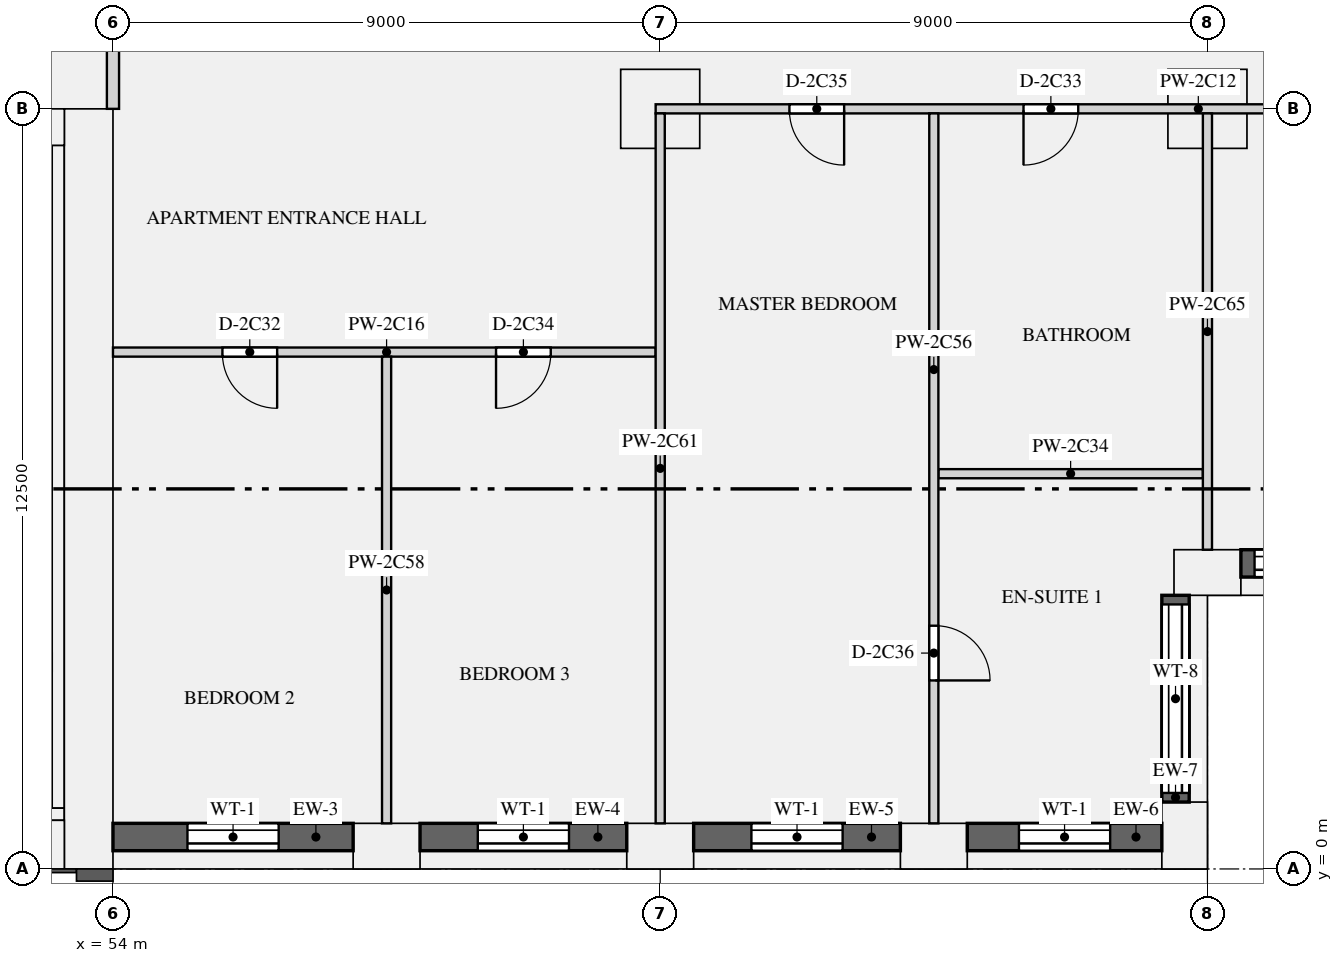
"""IFC4 building model, lengths in metres.
Left out: names, types, materials, properties, quantities, classifications, styles, units other than length and angle.
Written with IfcOpenShell. Run it as: python <this file> out.ifc"""

import sys

from ifc_helpers import new_model, si_unit, direction, frame, frame_2d, origin, origin_2d, place, context, subcontext, project, spatial, rectangle, extrude, element, fill, save


model = new_model("IFC4")
c1 = context("Model", 3, precision=1e-05, world=origin(), true_north=direction((0.0, 1.0)))
c2 = subcontext(c1, "Body", "Model", "MODEL_VIEW")
j1 = project(units=[si_unit("LENGTHUNIT", "METRE"), si_unit("PLANEANGLEUNIT", "RADIAN")], contexts=[c1])
p1 = place(None, origin())
s1 = spatial("IfcSite", under=j1, at=p1, CompositionType="ELEMENT")
p2 = place(p1, origin())
s2 = spatial("IfcBuilding", under=s1, at=p2, CompositionType="ELEMENT")
p3 = place(p2, frame((0.0, 0.0, 102.45)))
s3 = spatial("IfcBuildingStorey", under=s2, at=p3, CompositionType="ELEMENT", Elevation=102.45)
for number, where, z_axis, x_axis in (
    (1, (58.5, 0.375, 0.0), (0.0, 0.0, 1.0), (1.0, 0.0, 0.0)),
    (2, (63.0, 0.375, 0.0), (0.0, 0.0, 1.0), (1.0, 0.0, 0.0)),
    (3, (67.5, 0.375, 0.0), (0.0, 0.0, 1.0), (1.0, 0.0, 0.0)),
    (4, (71.625, 0.55, 0.0), (0.0, 0.0, 1.0), (0.0, 1.0, 0.0)),
    (5, (72.0, 4.875, 0.0), (0.0, 0.0, 1.0), (1.0, 0.0, 0.0)),
):
    element("IfcColumn", number, at=place(p3, frame(where, z_axis=z_axis, x_axis=x_axis)), inside=s3, PredefinedType="USERDEFINED", context=c2, shape_type="SweptSolid", body=[
        extrude(rectangle(XDim=1.1, YDim=0.75, at=origin_2d()), origin(), (0.0, 0.0, 1.0), 3.15),
    ])
for number, where, z_axis, x_axis in (
    (6, (63.0, 12.5, 0.0), (0.0, 0.0, 1.0), (1.0, 0.0, 0.0)),
    (7, (72.0, 12.5, 0.0), (0.0, 0.0, 1.0), (1.0, 0.0, 0.0)),
):
    element("IfcColumn", number, at=place(p3, frame(where, z_axis=z_axis, x_axis=x_axis)), inside=s3, PredefinedType="COLUMN", context=c2, shape_type="SweptSolid", body=[
        extrude(rectangle(XDim=1.3, YDim=1.3, at=origin_2d()), origin(), (0.0, 0.0, 1.0), 3.15),
    ])
p4 = place(p3, frame((53.6, 0.0, 0.0), z_axis=(0.0, 0.0, 1.0), x_axis=(0.0, 1.0, 0.0)))
e8 = element("IfcWall", 8, at=p4, inside=s3, PredefinedType="SHEAR", context=c2, shape_type="SweptSolid", body=[
    extrude(rectangle(XDim=12.5, YDim=0.8, at=frame_2d((6.25, 0.0))), origin(), (0.0, 0.0, 1.0), 3.15),
])
p5 = place(p3, frame((18.8, 0.4, 0.0), z_axis=(0.0, 0.0, 1.0), x_axis=(1.0, 0.0, 0.0)))
e9 = element("IfcWall", 9, at=p5, inside=s3, PredefinedType="SHEAR", context=c2, shape_type="SweptSolid", body=[
    extrude(rectangle(XDim=34.4, YDim=0.8, at=frame_2d((17.2, 0.0))), origin(), (0.0, 0.0, 1.0), 3.15),
])
p6 = place(p3, frame((18.8, 12.2, 0.0), z_axis=(0.0, 0.0, 1.0), x_axis=(1.0, 0.0, 0.0)))
e10 = element("IfcWall", 10, at=p6, inside=s3, PredefinedType="SHEAR", context=c2, shape_type="SweptSolid", body=[
    extrude(rectangle(XDim=34.4, YDim=0.6, at=frame_2d((17.2, 0.0))), origin(), (0.0, 0.0, 1.0), 3.15),
])
p7 = place(p6, frame((24.375, 0.0, 0.0)))
e11 = element("IfcOpeningElement", 11, at=p7, cuts=e10, PredefinedType="OPENING", context=c2, shape_type="SweptSolid", body=[
    extrude(rectangle(XDim=1.1, YDim=2.1, at=frame_2d((0.55, 1.05))), frame((0.0, 0.31, 0.0), z_axis=(0.0, -1.0, 0.0), x_axis=(1.0, 0.0, 0.0)), (0.0, 0.0, 1.0), 0.62),
])
p8 = place(p6, frame((26.625, 0.0, 0.0)))
e12 = element("IfcOpeningElement", 12, at=p8, cuts=e10, PredefinedType="OPENING", context=c2, shape_type="SweptSolid", body=[
    extrude(rectangle(XDim=1.1, YDim=2.1, at=frame_2d((0.55, 1.05))), frame((0.0, 0.31, 0.0), z_axis=(0.0, -1.0, 0.0), x_axis=(1.0, 0.0, 0.0)), (0.0, 0.0, 1.0), 0.62),
])
p9 = place(p6, frame((28.875, 0.0, 0.0)))
e13 = element("IfcOpeningElement", 13, at=p9, cuts=e10, PredefinedType="OPENING", context=c2, shape_type="SweptSolid", body=[
    extrude(rectangle(XDim=1.1, YDim=2.1, at=frame_2d((0.55, 1.05))), frame((0.0, 0.31, 0.0), z_axis=(0.0, -1.0, 0.0), x_axis=(1.0, 0.0, 0.0)), (0.0, 0.0, 1.0), 0.62),
])
p10 = place(p6, frame((4.75, 0.0, 0.0)))
e14 = element("IfcOpeningElement", 14, at=p10, cuts=e10, PredefinedType="OPENING", context=c2, shape_type="SweptSolid", body=[
    extrude(rectangle(XDim=0.9, YDim=2.1, at=frame_2d((0.45, 1.05))), frame((0.0, 0.31, 0.0), z_axis=(0.0, -1.0, 0.0), x_axis=(1.0, 0.0, 0.0)), (0.0, 0.0, 1.0), 0.62),
])
p11 = place(p6, frame((13.75, 0.0, 0.0)))
e15 = element("IfcOpeningElement", 15, at=p11, cuts=e10, PredefinedType="OPENING", context=c2, shape_type="SweptSolid", body=[
    extrude(rectangle(XDim=0.9, YDim=2.1, at=frame_2d((0.45, 1.05))), frame((0.0, 0.31, 0.0), z_axis=(0.0, -1.0, 0.0), x_axis=(1.0, 0.0, 0.0)), (0.0, 0.0, 1.0), 0.62),
])
p12 = place(p6, frame((18.25, 0.0, 0.0)))
e16 = element("IfcOpeningElement", 16, at=p12, cuts=e10, PredefinedType="OPENING", context=c2, shape_type="SweptSolid", body=[
    extrude(rectangle(XDim=0.9, YDim=2.1, at=frame_2d((0.45, 1.05))), frame((0.0, 0.31, 0.0), z_axis=(0.0, -1.0, 0.0), x_axis=(1.0, 0.0, 0.0)), (0.0, 0.0, 1.0), 0.62),
])
p13 = place(p6, frame((1.35, 0.0, 0.0)))
e17 = element("IfcOpeningElement", 17, at=p13, cuts=e10, PredefinedType="OPENING", context=c2, shape_type="SweptSolid", body=[
    extrude(rectangle(XDim=1.2, YDim=2.1, at=frame_2d((0.6, 1.05))), frame((0.0, 0.31, 0.0), z_axis=(0.0, -1.0, 0.0), x_axis=(1.0, 0.0, 0.0)), (0.0, 0.0, 1.0), 0.62),
])
p14 = place(p6, frame((31.85, 0.0, 0.0)))
e18 = element("IfcOpeningElement", 18, at=p14, cuts=e10, PredefinedType="OPENING", context=c2, shape_type="SweptSolid", body=[
    extrude(rectangle(XDim=1.2, YDim=2.1, at=frame_2d((0.6, 1.05))), frame((0.0, 0.31, 0.0), z_axis=(0.0, -1.0, 0.0), x_axis=(1.0, 0.0, 0.0)), (0.0, 0.0, 1.0), 0.62),
])
p15 = place(p3, frame((53.1, 1.0, 0.0), z_axis=(0.0, 0.0, 1.0), x_axis=(0.0, 1.0, 0.0)))
e19 = element("IfcWall", 19, at=p15, inside=s3, PredefinedType="SHEAR", context=c2, shape_type="SweptSolid", body=[
    extrude(rectangle(XDim=10.9, YDim=0.2, at=frame_2d((5.45, 0.0))), origin(), (0.0, 0.0, 1.0), 3.15),
])
p16 = place(p3, frame((18.8, 0.9, 0.0), z_axis=(0.0, 0.0, 1.0), x_axis=(1.0, 0.0, 0.0)))
e20 = element("IfcWall", 20, at=p16, inside=s3, PredefinedType="SHEAR", context=c2, shape_type="SweptSolid", body=[
    extrude(rectangle(XDim=34.4, YDim=0.2, at=frame_2d((17.2, 0.0))), origin(), (0.0, 0.0, 1.0), 3.15),
])
p17 = place(p3, frame((54.0, 0.525, 0.9), z_axis=(0.0, 0.0, 1.0), x_axis=(1.0, 0.0, 0.0)))
e21 = element("IfcWall", 21, at=p17, inside=s3, PredefinedType="SOLIDWALL", context=c2, shape_type="SweptSolid", body=[
    extrude(rectangle(XDim=3.95, YDim=0.45, at=frame_2d((1.975, 0.0))), origin(), (0.0, 0.0, 1.0), 1.93),
])
p18 = place(p17, frame((1.225, 0.0, 0.15)))
e22 = element("IfcOpeningElement", 22, at=p18, cuts=e21, PredefinedType="OPENING", context=c2, shape_type="SweptSolid", body=[
    extrude(rectangle(XDim=1.5, YDim=1.5, at=frame_2d((0.75, 0.75))), frame((0.0, 0.235, 0.0), z_axis=(0.0, -1.0, 0.0), x_axis=(1.0, 0.0, 0.0)), (0.0, 0.0, 1.0), 0.47),
])
p19 = place(p3, frame((59.05, 0.525, 0.9), z_axis=(0.0, 0.0, 1.0), x_axis=(1.0, 0.0, 0.0)))
e23 = element("IfcWall", 23, at=p19, inside=s3, PredefinedType="SOLIDWALL", context=c2, shape_type="SweptSolid", body=[
    extrude(rectangle(XDim=3.4, YDim=0.45, at=frame_2d((1.7, 0.0))), origin(), (0.0, 0.0, 1.0), 1.93),
])
p20 = place(p19, frame((0.95, 0.0, 0.15)))
e24 = element("IfcOpeningElement", 24, at=p20, cuts=e23, PredefinedType="OPENING", context=c2, shape_type="SweptSolid", body=[
    extrude(rectangle(XDim=1.5, YDim=1.5, at=frame_2d((0.75, 0.75))), frame((0.0, 0.235, 0.0), z_axis=(0.0, -1.0, 0.0), x_axis=(1.0, 0.0, 0.0)), (0.0, 0.0, 1.0), 0.47),
])
p21 = place(p3, frame((63.55, 0.525, 0.9), z_axis=(0.0, 0.0, 1.0), x_axis=(1.0, 0.0, 0.0)))
e25 = element("IfcWall", 25, at=p21, inside=s3, PredefinedType="SOLIDWALL", context=c2, shape_type="SweptSolid", body=[
    extrude(rectangle(XDim=3.4, YDim=0.45, at=frame_2d((1.7, 0.0))), origin(), (0.0, 0.0, 1.0), 1.93),
])
p22 = place(p21, frame((0.95, 0.0, 0.15)))
e26 = element("IfcOpeningElement", 26, at=p22, cuts=e25, PredefinedType="OPENING", context=c2, shape_type="SweptSolid", body=[
    extrude(rectangle(XDim=1.5, YDim=1.5, at=frame_2d((0.75, 0.75))), frame((0.0, 0.235, 0.0), z_axis=(0.0, -1.0, 0.0), x_axis=(1.0, 0.0, 0.0)), (0.0, 0.0, 1.0), 0.47),
])
p23 = place(p3, frame((68.05, 0.525, 0.9), z_axis=(0.0, 0.0, 1.0), x_axis=(1.0, 0.0, 0.0)))
e27 = element("IfcWall", 27, at=p23, inside=s3, PredefinedType="SOLIDWALL", context=c2, shape_type="SweptSolid", body=[
    extrude(rectangle(XDim=3.2, YDim=0.45, at=frame_2d((1.6, 0.0))), origin(), (0.0, 0.0, 1.0), 1.93),
])
p24 = place(p23, frame((0.85, 0.0, 0.15)))
e28 = element("IfcOpeningElement", 28, at=p24, cuts=e27, PredefinedType="OPENING", context=c2, shape_type="SweptSolid", body=[
    extrude(rectangle(XDim=1.5, YDim=1.5, at=frame_2d((0.75, 0.75))), frame((0.0, 0.235, 0.0), z_axis=(0.0, -1.0, 0.0), x_axis=(1.0, 0.0, 0.0)), (0.0, 0.0, 1.0), 0.47),
])
p25 = place(p3, frame((71.475, 1.1, 0.9), z_axis=(0.0, 0.0, 1.0), x_axis=(0.0, 1.0, 0.0)))
e29 = element("IfcWall", 29, at=p25, inside=s3, PredefinedType="SOLIDWALL", context=c2, shape_type="SweptSolid", body=[
    extrude(rectangle(XDim=3.4, YDim=0.45, at=frame_2d((1.7, 0.0))), origin(), (0.0, 0.0, 1.0), 1.93),
])
p26 = place(p25, frame((0.15, 0.0, 0.15)))
e30 = element("IfcOpeningElement", 30, at=p26, cuts=e29, PredefinedType="OPENING", context=c2, shape_type="SweptSolid", body=[
    extrude(rectangle(XDim=3.1, YDim=1.5, at=frame_2d((1.55, 0.75))), frame((0.0, 0.235, 0.0), z_axis=(0.0, -1.0, 0.0), x_axis=(1.0, 0.0, 0.0)), (0.0, 0.0, 1.0), 0.47),
])
p27 = place(p3, frame((72.55, 5.025, 0.9), z_axis=(0.0, 0.0, 1.0), x_axis=(1.0, 0.0, 0.0)))
e31 = element("IfcWall", 31, at=p27, inside=s3, PredefinedType="SOLIDWALL", context=c2, shape_type="SweptSolid", body=[
    extrude(rectangle(XDim=3.2, YDim=0.45, at=frame_2d((1.6, 0.0))), origin(), (0.0, 0.0, 1.0), 1.93),
])
p28 = place(p27, frame((0.225, 0.0, 0.15)))
e32 = element("IfcOpeningElement", 32, at=p28, cuts=e31, PredefinedType="OPENING", context=c2, shape_type="SweptSolid", body=[
    extrude(rectangle(XDim=2.75, YDim=1.5, at=frame_2d((1.375, 0.75))), frame((0.0, 0.235, 0.0), z_axis=(0.0, -1.0, 0.0), x_axis=(1.0, 0.0, 0.0)), (0.0, 0.0, 1.0), 0.47),
])
p29 = place(p3, frame((54.0, 12.5, 0.0), z_axis=(0.0, 0.0, 1.0), x_axis=(0.0, 1.0, 0.0)))
e33 = element("IfcWall", 33, at=p29, inside=s3, PredefinedType="PARTITIONING", context=c2, shape_type="SweptSolid", body=[
    extrude(rectangle(XDim=3.4, YDim=0.2, at=frame_2d((1.7, 0.0))), origin(), (0.0, 0.0, 1.0), 2.83),
])
p30 = place(p3, frame((62.925, 12.5, 0.0), z_axis=(0.0, 0.0, 1.0), x_axis=(1.0, 0.0, 0.0)))
e34 = element("IfcWall", 34, at=p30, inside=s3, PredefinedType="PARTITIONING", context=c2, shape_type="SweptSolid", body=[
    extrude(rectangle(XDim=12.825, YDim=0.15, at=frame_2d((6.413, 0.0))), origin(), (0.0, 0.0, 1.0), 2.83),
])
p31 = place(p30, frame((6.05, 0.0, 0.0)))
e35 = element("IfcOpeningElement", 35, at=p31, cuts=e34, PredefinedType="OPENING", context=c2, shape_type="SweptSolid", body=[
    extrude(rectangle(XDim=0.9, YDim=2.1, at=frame_2d((0.45, 1.05))), frame((0.0, 0.085, 0.0), z_axis=(0.0, -1.0, 0.0), x_axis=(1.0, 0.0, 0.0)), (0.0, 0.0, 1.0), 0.17),
])
p32 = place(p30, frame((2.2, 0.0, 0.0)))
e36 = element("IfcOpeningElement", 36, at=p32, cuts=e34, PredefinedType="OPENING", context=c2, shape_type="SweptSolid", body=[
    extrude(rectangle(XDim=0.9, YDim=2.1, at=frame_2d((0.45, 1.05))), frame((0.0, 0.085, 0.0), z_axis=(0.0, -1.0, 0.0), x_axis=(1.0, 0.0, 0.0)), (0.0, 0.0, 1.0), 0.17),
])
p33 = place(p30, frame((10.9, 0.0, 0.0)))
e37 = element("IfcOpeningElement", 37, at=p33, cuts=e34, PredefinedType="OPENING", context=c2, shape_type="SweptSolid", body=[
    extrude(rectangle(XDim=0.9, YDim=2.1, at=frame_2d((0.45, 1.05))), frame((0.0, 0.085, 0.0), z_axis=(0.0, -1.0, 0.0), x_axis=(1.0, 0.0, 0.0)), (0.0, 0.0, 1.0), 0.17),
])
p34 = place(p3, frame((54.0, 8.5, 0.0), z_axis=(0.0, 0.0, 1.0), x_axis=(1.0, 0.0, 0.0)))
e38 = element("IfcWall", 38, at=p34, inside=s3, PredefinedType="PARTITIONING", context=c2, shape_type="SweptSolid", body=[
    extrude(rectangle(XDim=8.925, YDim=0.15, at=frame_2d((4.462, 0.0))), origin(), (0.0, 0.0, 1.0), 2.83),
])
p35 = place(p34, frame((1.8, 0.0, 0.0)))
e39 = element("IfcOpeningElement", 39, at=p35, cuts=e38, PredefinedType="OPENING", context=c2, shape_type="SweptSolid", body=[
    extrude(rectangle(XDim=0.9, YDim=2.1, at=frame_2d((0.45, 1.05))), frame((0.0, 0.085, 0.0), z_axis=(0.0, -1.0, 0.0), x_axis=(1.0, 0.0, 0.0)), (0.0, 0.0, 1.0), 0.17),
])
p36 = place(p34, frame((6.3, 0.0, 0.0)))
e40 = element("IfcOpeningElement", 40, at=p36, cuts=e38, PredefinedType="OPENING", context=c2, shape_type="SweptSolid", body=[
    extrude(rectangle(XDim=0.9, YDim=2.1, at=frame_2d((0.45, 1.05))), frame((0.0, 0.085, 0.0), z_axis=(0.0, -1.0, 0.0), x_axis=(1.0, 0.0, 0.0)), (0.0, 0.0, 1.0), 0.17),
])
p37 = place(p3, frame((67.575, 6.5, 0.0), z_axis=(0.0, 0.0, 1.0), x_axis=(1.0, 0.0, 0.0)))
e41 = element("IfcWall", 41, at=p37, inside=s3, PredefinedType="PARTITIONING", context=c2, shape_type="SweptSolid", body=[
    extrude(rectangle(XDim=4.35, YDim=0.15, at=frame_2d((2.175, 0.0))), origin(), (0.0, 0.0, 1.0), 2.83),
])
p38 = place(p3, frame((67.5, 0.75, 0.0), z_axis=(0.0, 0.0, 1.0), x_axis=(0.0, 1.0, 0.0)))
e42 = element("IfcWall", 42, at=p38, inside=s3, PredefinedType="PARTITIONING", context=c2, shape_type="SweptSolid", body=[
    extrude(rectangle(XDim=11.675, YDim=0.15, at=frame_2d((5.837, 0.0))), origin(), (0.0, 0.0, 1.0), 2.83),
])
p39 = place(p38, frame((2.35, 0.0, 0.0)))
e43 = element("IfcOpeningElement", 43, at=p39, cuts=e42, PredefinedType="OPENING", context=c2, shape_type="SweptSolid", body=[
    extrude(rectangle(XDim=0.9, YDim=2.1, at=frame_2d((0.45, 1.05))), frame((0.0, 0.085, 0.0), z_axis=(0.0, -1.0, 0.0), x_axis=(1.0, 0.0, 0.0)), (0.0, 0.0, 1.0), 0.17),
])
p40 = place(p3, frame((58.5, 0.75, 0.0), z_axis=(0.0, 0.0, 1.0), x_axis=(0.0, 1.0, 0.0)))
e44 = element("IfcWall", 44, at=p40, inside=s3, PredefinedType="PARTITIONING", context=c2, shape_type="SweptSolid", body=[
    extrude(rectangle(XDim=7.675, YDim=0.15, at=frame_2d((3.837, 0.0))), origin(), (0.0, 0.0, 1.0), 2.83),
])
p41 = place(p3, frame((63.0, 0.75, 0.0), z_axis=(0.0, 0.0, 1.0), x_axis=(0.0, 1.0, 0.0)))
e45 = element("IfcWall", 45, at=p41, inside=s3, PredefinedType="PARTITIONING", context=c2, shape_type="SweptSolid", body=[
    extrude(rectangle(XDim=11.675, YDim=0.15, at=frame_2d((5.837, 0.0))), origin(), (0.0, 0.0, 1.0), 2.83),
])
p42 = place(p3, frame((72.0, 5.25, 0.0), z_axis=(0.0, 0.0, 1.0), x_axis=(0.0, 1.0, 0.0)))
e46 = element("IfcWall", 46, at=p42, inside=s3, PredefinedType="PARTITIONING", context=c2, shape_type="SweptSolid", body=[
    extrude(rectangle(XDim=7.175, YDim=0.15, at=frame_2d((3.587, 0.0))), origin(), (0.0, 0.0, 1.0), 2.83),
])
p43 = place(p18, origin())
e47 = element("IfcWindow", 47, at=p43, inside=s3, PartitioningType="SINGLE_PANEL", PredefinedType="WINDOW", context=c2, shape_type="SweptSolid", body=[
    extrude(rectangle(XDim=1.5, YDim=1.5, at=frame_2d((0.75, 0.75))), frame((0.0, -0.065, 0.0), z_axis=(0.0, -1.0, 0.0), x_axis=(1.0, 0.0, 0.0)), (0.0, 0.0, 1.0), 0.06),
])
fill(e22, e47)
p44 = place(p20, origin())
e48 = element("IfcWindow", 48, at=p44, inside=s3, PartitioningType="SINGLE_PANEL", PredefinedType="WINDOW", context=c2, shape_type="SweptSolid", body=[
    extrude(rectangle(XDim=1.5, YDim=1.5, at=frame_2d((0.75, 0.75))), frame((0.0, -0.065, 0.0), z_axis=(0.0, -1.0, 0.0), x_axis=(1.0, 0.0, 0.0)), (0.0, 0.0, 1.0), 0.06),
])
fill(e24, e48)
p45 = place(p22, origin())
e49 = element("IfcWindow", 49, at=p45, inside=s3, PartitioningType="SINGLE_PANEL", PredefinedType="WINDOW", context=c2, shape_type="SweptSolid", body=[
    extrude(rectangle(XDim=1.5, YDim=1.5, at=frame_2d((0.75, 0.75))), frame((0.0, -0.065, 0.0), z_axis=(0.0, -1.0, 0.0), x_axis=(1.0, 0.0, 0.0)), (0.0, 0.0, 1.0), 0.06),
])
fill(e26, e49)
p46 = place(p24, origin())
e50 = element("IfcWindow", 50, at=p46, inside=s3, PartitioningType="SINGLE_PANEL", PredefinedType="WINDOW", context=c2, shape_type="SweptSolid", body=[
    extrude(rectangle(XDim=1.5, YDim=1.5, at=frame_2d((0.75, 0.75))), frame((0.0, -0.065, 0.0), z_axis=(0.0, -1.0, 0.0), x_axis=(1.0, 0.0, 0.0)), (0.0, 0.0, 1.0), 0.06),
])
fill(e28, e50)
p47 = place(p26, origin())
e51 = element("IfcWindow", 51, at=p47, inside=s3, PartitioningType="SINGLE_PANEL", PredefinedType="WINDOW", context=c2, shape_type="SweptSolid", body=[
    extrude(rectangle(XDim=3.1, YDim=1.5, at=frame_2d((1.55, 0.75))), frame((0.0, -0.065, 0.0), z_axis=(0.0, -1.0, 0.0), x_axis=(1.0, 0.0, 0.0)), (0.0, 0.0, 1.0), 0.06),
])
fill(e30, e51)
p48 = place(p28, origin())
e52 = element("IfcWindow", 52, at=p48, inside=s3, PartitioningType="SINGLE_PANEL", PredefinedType="WINDOW", context=c2, shape_type="SweptSolid", body=[
    extrude(rectangle(XDim=2.75, YDim=1.5, at=frame_2d((1.375, 0.75))), frame((0.0, -0.065, 0.0), z_axis=(0.0, -1.0, 0.0), x_axis=(1.0, 0.0, 0.0)), (0.0, 0.0, 1.0), 0.06),
])
fill(e32, e52)
p49 = place(p35, frame((0.9, 0.0, 0.0), z_axis=(0.0, 0.0, 1.0), x_axis=(-1.0, 0.0, 0.0)))
e53 = element("IfcDoor", 53, at=p49, inside=s3, OperationType="SINGLE_SWING_LEFT", PredefinedType="DOOR", context=c2, shape_type="SweptSolid", body=[
    extrude(rectangle(XDim=0.9, YDim=2.1, at=frame_2d((0.45, 1.05))), frame((0.0, 0.025, 0.0), z_axis=(0.0, -1.0, 0.0), x_axis=(1.0, 0.0, 0.0)), (0.0, 0.0, 1.0), 0.05),
])
fill(e39, e53)
p50 = place(p31, frame((0.9, 0.0, 0.0), z_axis=(0.0, 0.0, 1.0), x_axis=(-1.0, 0.0, 0.0)))
e54 = element("IfcDoor", 54, at=p50, inside=s3, OperationType="SINGLE_SWING_RIGHT", PredefinedType="DOOR", context=c2, shape_type="SweptSolid", body=[
    extrude(rectangle(XDim=0.9, YDim=2.1, at=frame_2d((0.45, 1.05))), frame((0.0, 0.025, 0.0), z_axis=(0.0, -1.0, 0.0), x_axis=(1.0, 0.0, 0.0)), (0.0, 0.0, 1.0), 0.05),
])
fill(e35, e54)
p51 = place(p36, frame((0.9, 0.0, 0.0), z_axis=(0.0, 0.0, 1.0), x_axis=(-1.0, 0.0, 0.0)))
e55 = element("IfcDoor", 55, at=p51, inside=s3, OperationType="SINGLE_SWING_RIGHT", PredefinedType="DOOR", context=c2, shape_type="SweptSolid", body=[
    extrude(rectangle(XDim=0.9, YDim=2.1, at=frame_2d((0.45, 1.05))), frame((0.0, 0.025, 0.0), z_axis=(0.0, -1.0, 0.0), x_axis=(1.0, 0.0, 0.0)), (0.0, 0.0, 1.0), 0.05),
])
fill(e40, e55)
p52 = place(p32, frame((0.9, 0.0, 0.0), z_axis=(0.0, 0.0, 1.0), x_axis=(-1.0, 0.0, 0.0)))
e56 = element("IfcDoor", 56, at=p52, inside=s3, OperationType="SINGLE_SWING_LEFT", PredefinedType="DOOR", context=c2, shape_type="SweptSolid", body=[
    extrude(rectangle(XDim=0.9, YDim=2.1, at=frame_2d((0.45, 1.05))), frame((0.0, 0.025, 0.0), z_axis=(0.0, -1.0, 0.0), x_axis=(1.0, 0.0, 0.0)), (0.0, 0.0, 1.0), 0.05),
])
fill(e36, e56)
p53 = place(p39, frame((0.9, 0.0, 0.0), z_axis=(0.0, 0.0, 1.0), x_axis=(-1.0, 0.0, 0.0)))
e57 = element("IfcDoor", 57, at=p53, inside=s3, OperationType="SINGLE_SWING_RIGHT", PredefinedType="DOOR", context=c2, shape_type="SweptSolid", body=[
    extrude(rectangle(XDim=0.9, YDim=2.1, at=frame_2d((0.45, 1.05))), frame((0.0, 0.025, 0.0), z_axis=(0.0, -1.0, 0.0), x_axis=(1.0, 0.0, 0.0)), (0.0, 0.0, 1.0), 0.05),
])
fill(e43, e57)
save(model, sys.argv[1])
